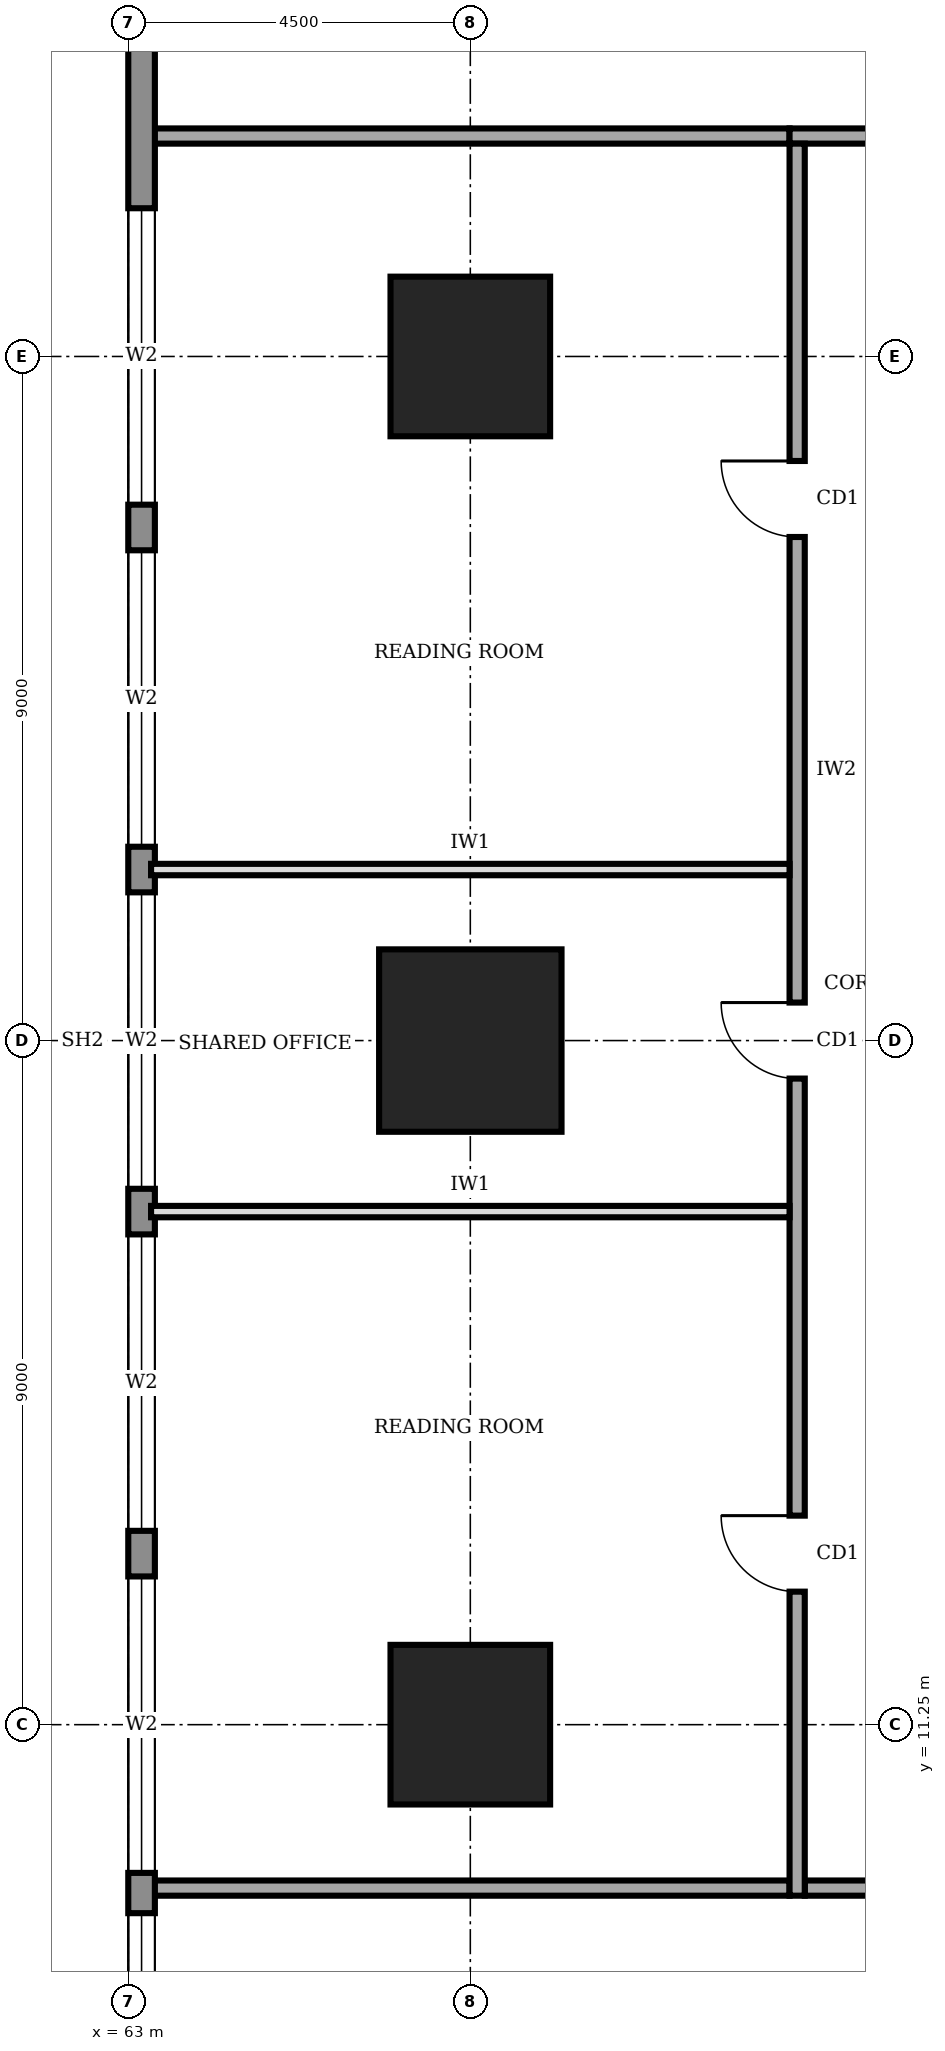
"""IFC4 building model, lengths in metres.
Left out: names, types, materials, properties, quantities, classifications, styles, units other than length and angle.
Written with IfcOpenShell. Run it as: python <this file> out.ifc"""

import sys

from ifc_helpers import new_model, si_unit, direction, frame, frame_2d, origin, origin_2d, place, context, subcontext, project, spatial, rectangle, extrude, element, fill, save


model = new_model("IFC4")
c1 = context("Model", 3, precision=1e-05, world=origin(), true_north=direction((0.0, 1.0)))
c2 = subcontext(c1, "Body", "Model", "MODEL_VIEW")
j1 = project(units=[si_unit("LENGTHUNIT", "METRE"), si_unit("PLANEANGLEUNIT", "RADIAN")], contexts=[c1])
p1 = place(None, origin())
s1 = spatial("IfcSite", under=j1, at=p1, CompositionType="ELEMENT")
p2 = place(p1, origin())
s2 = spatial("IfcBuilding", under=s1, at=p2, CompositionType="ELEMENT")
p3 = place(p2, frame((0.0, 0.0, 49.0)))
s3 = spatial("IfcBuildingStorey", under=s2, at=p3, CompositionType="ELEMENT", Elevation=49.0)
p4 = place(p3, frame((67.5, 11.25, 0.0), z_axis=(0.0, 0.0, 1.0), x_axis=(1.0, 0.0, 0.0)))
e1 = element("IfcColumn", 1, at=p4, inside=s3, PredefinedType="COLUMN", context=c2, shape_type="SweptSolid", body=[
    extrude(rectangle(XDim=2.1, YDim=2.1, at=origin_2d()), origin(), (0.0, 0.0, 1.0), 4.0),
])
p5 = place(p3, frame((67.5, 20.25, 0.0), z_axis=(0.0, 0.0, 1.0), x_axis=(1.0, 0.0, 0.0)))
e2 = element("IfcColumn", 2, at=p5, inside=s3, PredefinedType="COLUMN", context=c2, shape_type="SweptSolid", body=[
    extrude(rectangle(XDim=2.4, YDim=2.4, at=origin_2d()), origin(), (0.0, 0.0, 1.0), 4.0),
])
p6 = place(p3, frame((67.5, 29.25, 0.0), z_axis=(0.0, 0.0, 1.0), x_axis=(1.0, 0.0, 0.0)))
e3 = element("IfcColumn", 3, at=p6, inside=s3, PredefinedType="COLUMN", context=c2, shape_type="SweptSolid", body=[
    extrude(rectangle(XDim=2.1, YDim=2.1, at=origin_2d()), origin(), (0.0, 0.0, 1.0), 4.0),
])
p7 = place(p3, frame((63.175, 35.98, 0.0), z_axis=(0.0, 0.0, 1.0), x_axis=(0.0, -1.0, 0.0)))
e4 = element("IfcWall", 4, at=p7, inside=s3, PredefinedType="STANDARD", context=c2, shape_type="SweptSolid", body=[
    extrude(rectangle(XDim=31.46, YDim=0.35, at=frame_2d((15.73, 0.0))), origin(), (0.0, 0.0, 1.0), 3.75),
])
p8 = place(p7, frame((27.21, 0.0, 0.6)))
e5 = element("IfcOpeningElement", 5, at=p8, cuts=e4, PredefinedType="OPENING", context=c2, shape_type="SweptSolid", body=[
    extrude(rectangle(XDim=3.9, YDim=2.6, at=frame_2d((1.95, 1.3))), frame((0.0, 0.185, 0.0), z_axis=(0.0, -1.0, 0.0), x_axis=(1.0, 0.0, 0.0)), (0.0, 0.0, 1.0), 0.37),
])
p9 = place(p7, frame((22.78, 0.0, 0.6)))
e6 = element("IfcOpeningElement", 6, at=p9, cuts=e4, PredefinedType="OPENING", context=c2, shape_type="SweptSolid", body=[
    extrude(rectangle(XDim=3.9, YDim=2.6, at=frame_2d((1.95, 1.3))), frame((0.0, 0.185, 0.0), z_axis=(0.0, -1.0, 0.0), x_axis=(1.0, 0.0, 0.0)), (0.0, 0.0, 1.0), 0.37),
])
p10 = place(p7, frame((18.28, 0.0, 0.6)))
e7 = element("IfcOpeningElement", 7, at=p10, cuts=e4, PredefinedType="OPENING", context=c2, shape_type="SweptSolid", body=[
    extrude(rectangle(XDim=3.9, YDim=2.6, at=frame_2d((1.95, 1.3))), frame((0.0, 0.185, 0.0), z_axis=(0.0, -1.0, 0.0), x_axis=(1.0, 0.0, 0.0)), (0.0, 0.0, 1.0), 0.37),
])
p11 = place(p7, frame((13.78, 0.0, 0.6)))
e8 = element("IfcOpeningElement", 8, at=p11, cuts=e4, PredefinedType="OPENING", context=c2, shape_type="SweptSolid", body=[
    extrude(rectangle(XDim=3.9, YDim=2.6, at=frame_2d((1.95, 1.3))), frame((0.0, 0.185, 0.0), z_axis=(0.0, -1.0, 0.0), x_axis=(1.0, 0.0, 0.0)), (0.0, 0.0, 1.0), 0.37),
])
p12 = place(p7, frame((9.28, 0.0, 0.6)))
e9 = element("IfcOpeningElement", 9, at=p12, cuts=e4, PredefinedType="OPENING", context=c2, shape_type="SweptSolid", body=[
    extrude(rectangle(XDim=3.9, YDim=2.6, at=frame_2d((1.95, 1.3))), frame((0.0, 0.185, 0.0), z_axis=(0.0, -1.0, 0.0), x_axis=(1.0, 0.0, 0.0)), (0.0, 0.0, 1.0), 0.37),
])
p13 = place(p7, frame((4.78, 0.0, 0.6)))
e10 = element("IfcOpeningElement", 10, at=p13, cuts=e4, PredefinedType="OPENING", context=c2, shape_type="SweptSolid", body=[
    extrude(rectangle(XDim=3.9, YDim=2.6, at=frame_2d((1.95, 1.3))), frame((0.0, 0.185, 0.0), z_axis=(0.0, -1.0, 0.0), x_axis=(1.0, 0.0, 0.0)), (0.0, 0.0, 1.0), 0.37),
])
p14 = place(p3, frame((71.9, 9.1, 0.0), z_axis=(0.0, 0.0, 1.0), x_axis=(1.0, 0.0, 0.0)))
e11 = element("IfcWall", 11, at=p14, inside=s3, PredefinedType="SOLIDWALL", context=c2, shape_type="SweptSolid", body=[
    extrude(rectangle(XDim=17.65, YDim=0.2, at=frame_2d((8.825, 0.0))), origin(), (0.0, 0.0, 1.0), 3.75),
])
p15 = place(p14, frame((5.8, 0.0, 0.0)))
e12 = element("IfcOpeningElement", 12, at=p15, cuts=e11, PredefinedType="OPENING", context=c2, shape_type="SweptSolid", body=[
    extrude(rectangle(XDim=1.8, YDim=2.1, at=frame_2d((0.9, 1.05))), frame((0.0, 0.11, 0.0), z_axis=(0.0, -1.0, 0.0), x_axis=(1.0, 0.0, 0.0)), (0.0, 0.0, 1.0), 0.22),
])
p16 = place(p14, frame((14.725, 0.0, 0.0)))
e13 = element("IfcOpeningElement", 13, at=p16, cuts=e11, PredefinedType="OPENING", context=c2, shape_type="SweptSolid", body=[
    extrude(rectangle(XDim=1.8, YDim=2.1, at=frame_2d((0.9, 1.05))), frame((0.0, 0.11, 0.0), z_axis=(0.0, -1.0, 0.0), x_axis=(1.0, 0.0, 0.0)), (0.0, 0.0, 1.0), 0.22),
])
p17 = place(p3, frame((89.35, 32.15, 0.0), z_axis=(0.0, 0.0, 1.0), x_axis=(-1.0, 0.0, 0.0)))
e14 = element("IfcWall", 14, at=p17, inside=s3, PredefinedType="SOLIDWALL", context=c2, shape_type="SweptSolid", body=[
    extrude(rectangle(XDim=17.65, YDim=0.2, at=frame_2d((8.825, 0.0))), origin(), (0.0, 0.0, 1.0), 3.75),
])
p18 = place(p17, frame((14.75, 0.0, 0.0)))
e15 = element("IfcOpeningElement", 15, at=p18, cuts=e14, PredefinedType="OPENING", context=c2, shape_type="SweptSolid", body=[
    extrude(rectangle(XDim=1.0, YDim=2.1, at=frame_2d((0.5, 1.05))), frame((0.0, 0.11, 0.0), z_axis=(0.0, -1.0, 0.0), x_axis=(1.0, 0.0, 0.0)), (0.0, 0.0, 1.0), 0.22),
])
p19 = place(p17, frame((7.85, 0.0, 0.0)))
e16 = element("IfcOpeningElement", 16, at=p19, cuts=e14, PredefinedType="OPENING", context=c2, shape_type="SweptSolid", body=[
    extrude(rectangle(XDim=1.0, YDim=2.1, at=frame_2d((0.5, 1.05))), frame((0.0, 0.11, 0.0), z_axis=(0.0, -1.0, 0.0), x_axis=(1.0, 0.0, 0.0)), (0.0, 0.0, 1.0), 0.22),
])
p20 = place(p17, frame((1.325, 0.0, 0.0)))
e17 = element("IfcOpeningElement", 17, at=p20, cuts=e14, PredefinedType="OPENING", context=c2, shape_type="SweptSolid", body=[
    extrude(rectangle(XDim=1.0, YDim=2.1, at=frame_2d((0.5, 1.05))), frame((0.0, 0.11, 0.0), z_axis=(0.0, -1.0, 0.0), x_axis=(1.0, 0.0, 0.0)), (0.0, 0.0, 1.0), 0.22),
])
p21 = place(p3, frame((71.8, 32.05, 0.0), z_axis=(0.0, 0.0, 1.0), x_axis=(0.0, -1.0, 0.0)))
e18 = element("IfcWall", 18, at=p21, inside=s3, PredefinedType="SOLIDWALL", context=c2, shape_type="SweptSolid", body=[
    extrude(rectangle(XDim=23.05, YDim=0.2, at=frame_2d((11.525, 0.0))), origin(), (0.0, 0.0, 1.0), 3.75),
])
p22 = place(p21, frame((18.05, 0.0, 0.0)))
e19 = element("IfcOpeningElement", 19, at=p22, cuts=e18, PredefinedType="OPENING", context=c2, shape_type="SweptSolid", body=[
    extrude(rectangle(XDim=1.0, YDim=2.1, at=frame_2d((0.5, 1.05))), frame((0.0, 0.11, 0.0), z_axis=(0.0, -1.0, 0.0), x_axis=(1.0, 0.0, 0.0)), (0.0, 0.0, 1.0), 0.22),
])
p23 = place(p21, frame((11.3, 0.0, 0.0)))
e20 = element("IfcOpeningElement", 20, at=p23, cuts=e18, PredefinedType="OPENING", context=c2, shape_type="SweptSolid", body=[
    extrude(rectangle(XDim=1.0, YDim=2.1, at=frame_2d((0.5, 1.05))), frame((0.0, 0.11, 0.0), z_axis=(0.0, -1.0, 0.0), x_axis=(1.0, 0.0, 0.0)), (0.0, 0.0, 1.0), 0.22),
])
p24 = place(p21, frame((4.175, 0.0, 0.0)))
e21 = element("IfcOpeningElement", 21, at=p24, cuts=e18, PredefinedType="OPENING", context=c2, shape_type="SweptSolid", body=[
    extrude(rectangle(XDim=1.0, YDim=2.1, at=frame_2d((0.5, 1.05))), frame((0.0, 0.11, 0.0), z_axis=(0.0, -1.0, 0.0), x_axis=(1.0, 0.0, 0.0)), (0.0, 0.0, 1.0), 0.22),
])
for number, where, z_axis, x_axis in (
    (22, (63.3, 9.1, 0.0), (0.0, 0.0, 1.0), (1.0, 0.0, 0.0)),
    (23, (63.3, 32.15, 0.0), (0.0, 0.0, 1.0), (1.0, 0.0, 0.0)),
):
    element("IfcWall", number, at=place(p3, frame(where, z_axis=z_axis, x_axis=x_axis)), inside=s3, PredefinedType="SOLIDWALL", context=c2, shape_type="SweptSolid", body=[
        extrude(rectangle(XDim=8.4, YDim=0.2, at=frame_2d((4.2, 0.0))), origin(), (0.0, 0.0, 1.0), 3.75),
    ])
for number, where, z_axis, x_axis in (
    (24, (63.3, 18.0, 0.0), (0.0, 0.0, 1.0), (1.0, 0.0, 0.0)),
    (25, (63.3, 22.5, 0.0), (0.0, 0.0, 1.0), (1.0, 0.0, 0.0)),
):
    element("IfcWall", number, at=place(p3, frame(where, z_axis=z_axis, x_axis=x_axis)), inside=s3, PredefinedType="PARTITIONING", context=c2, shape_type="SweptSolid", body=[
        extrude(rectangle(XDim=8.4, YDim=0.15, at=frame_2d((4.2, 0.0))), origin(), (0.0, 0.0, 1.0), 3.75),
    ])
p25 = place(p8, origin())
e26 = element("IfcWindow", 26, at=p25, inside=s3, PartitioningType="SINGLE_PANEL", PredefinedType="WINDOW", context=c2, shape_type="SweptSolid", body=[
    extrude(rectangle(XDim=3.9, YDim=2.6, at=frame_2d((1.95, 1.3))), frame((0.0, 0.03, 0.0), z_axis=(0.0, -1.0, 0.0), x_axis=(1.0, 0.0, 0.0)), (0.0, 0.0, 1.0), 0.06),
])
fill(e5, e26)
p26 = place(p9, origin())
e27 = element("IfcWindow", 27, at=p26, inside=s3, PartitioningType="SINGLE_PANEL", PredefinedType="WINDOW", context=c2, shape_type="SweptSolid", body=[
    extrude(rectangle(XDim=3.9, YDim=2.6, at=frame_2d((1.95, 1.3))), frame((0.0, 0.03, 0.0), z_axis=(0.0, -1.0, 0.0), x_axis=(1.0, 0.0, 0.0)), (0.0, 0.0, 1.0), 0.06),
])
fill(e6, e27)
p27 = place(p10, origin())
e28 = element("IfcWindow", 28, at=p27, inside=s3, PartitioningType="SINGLE_PANEL", PredefinedType="WINDOW", context=c2, shape_type="SweptSolid", body=[
    extrude(rectangle(XDim=3.9, YDim=2.6, at=frame_2d((1.95, 1.3))), frame((0.0, 0.03, 0.0), z_axis=(0.0, -1.0, 0.0), x_axis=(1.0, 0.0, 0.0)), (0.0, 0.0, 1.0), 0.06),
])
fill(e7, e28)
p28 = place(p11, origin())
e29 = element("IfcWindow", 29, at=p28, inside=s3, PartitioningType="SINGLE_PANEL", PredefinedType="WINDOW", context=c2, shape_type="SweptSolid", body=[
    extrude(rectangle(XDim=3.9, YDim=2.6, at=frame_2d((1.95, 1.3))), frame((0.0, 0.03, 0.0), z_axis=(0.0, -1.0, 0.0), x_axis=(1.0, 0.0, 0.0)), (0.0, 0.0, 1.0), 0.06),
])
fill(e8, e29)
p29 = place(p12, origin())
e30 = element("IfcWindow", 30, at=p29, inside=s3, PartitioningType="SINGLE_PANEL", PredefinedType="WINDOW", context=c2, shape_type="SweptSolid", body=[
    extrude(rectangle(XDim=3.9, YDim=2.6, at=frame_2d((1.95, 1.3))), frame((0.0, 0.03, 0.0), z_axis=(0.0, -1.0, 0.0), x_axis=(1.0, 0.0, 0.0)), (0.0, 0.0, 1.0), 0.06),
])
fill(e9, e30)
p30 = place(p13, origin())
e31 = element("IfcWindow", 31, at=p30, inside=s3, PartitioningType="SINGLE_PANEL", PredefinedType="WINDOW", context=c2, shape_type="SweptSolid", body=[
    extrude(rectangle(XDim=3.9, YDim=2.6, at=frame_2d((1.95, 1.3))), frame((0.0, 0.03, 0.0), z_axis=(0.0, -1.0, 0.0), x_axis=(1.0, 0.0, 0.0)), (0.0, 0.0, 1.0), 0.06),
])
fill(e10, e31)
p31 = place(p22, frame((1.0, 0.0, 0.0), z_axis=(0.0, 0.0, 1.0), x_axis=(-1.0, 0.0, 0.0)))
e32 = element("IfcDoor", 32, at=p31, inside=s3, OperationType="SINGLE_SWING_RIGHT", PredefinedType="DOOR", context=c2, shape_type="SweptSolid", body=[
    extrude(rectangle(XDim=1.0, YDim=2.1, at=frame_2d((0.5, 1.05))), frame((0.0, 0.025, 0.0), z_axis=(0.0, -1.0, 0.0), x_axis=(1.0, 0.0, 0.0)), (0.0, 0.0, 1.0), 0.05),
])
fill(e19, e32)
p32 = place(p23, frame((1.0, 0.0, 0.0), z_axis=(0.0, 0.0, 1.0), x_axis=(-1.0, 0.0, 0.0)))
e33 = element("IfcDoor", 33, at=p32, inside=s3, OperationType="SINGLE_SWING_RIGHT", PredefinedType="DOOR", context=c2, shape_type="SweptSolid", body=[
    extrude(rectangle(XDim=1.0, YDim=2.1, at=frame_2d((0.5, 1.05))), frame((0.0, 0.025, 0.0), z_axis=(0.0, -1.0, 0.0), x_axis=(1.0, 0.0, 0.0)), (0.0, 0.0, 1.0), 0.05),
])
fill(e20, e33)
p33 = place(p24, frame((1.0, 0.0, 0.0), z_axis=(0.0, 0.0, 1.0), x_axis=(-1.0, 0.0, 0.0)))
e34 = element("IfcDoor", 34, at=p33, inside=s3, OperationType="SINGLE_SWING_RIGHT", PredefinedType="DOOR", context=c2, shape_type="SweptSolid", body=[
    extrude(rectangle(XDim=1.0, YDim=2.1, at=frame_2d((0.5, 1.05))), frame((0.0, 0.025, 0.0), z_axis=(0.0, -1.0, 0.0), x_axis=(1.0, 0.0, 0.0)), (0.0, 0.0, 1.0), 0.05),
])
fill(e21, e34)
save(model, sys.argv[1])
